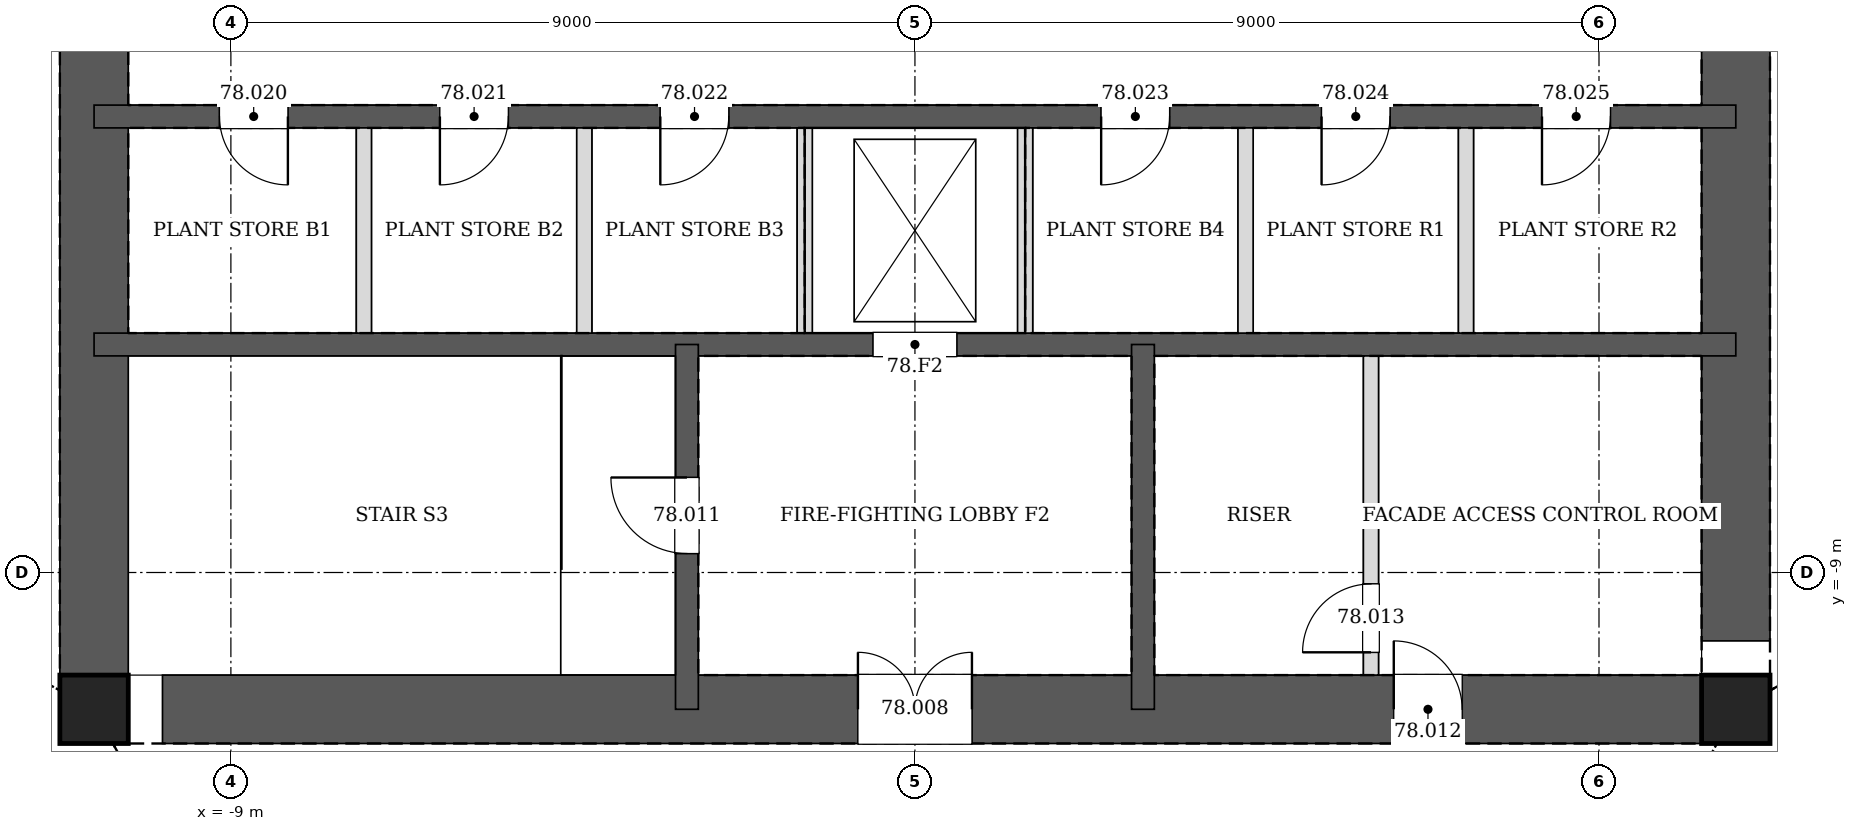
"""IFC4 building model, lengths in metres.
Left out: names, types, materials, properties, quantities, classifications, styles, units other than length and angle.
Written with IfcOpenShell. Run it as: python <this file> out.ifc"""

import sys

from ifc_helpers import new_model, si_unit, direction, frame, frame_2d, origin, origin_2d, place, context, subcontext, project, spatial, rectangle, hollow_rectangle, extrude, element, fill, save


model = new_model("IFC4")
c1 = context("Model", 3, precision=1e-05, world=origin(), true_north=direction((0.0, 1.0)))
c2 = subcontext(c1, "Body", "Model", "MODEL_VIEW")
j1 = project(units=[si_unit("LENGTHUNIT", "METRE"), si_unit("PLANEANGLEUNIT", "RADIAN")], contexts=[c1])
p1 = place(None, origin())
s1 = spatial("IfcSite", under=j1, at=p1, CompositionType="ELEMENT")
p2 = place(p1, origin())
s2 = spatial("IfcBuilding", under=s1, at=p2, CompositionType="ELEMENT")
p3 = place(p2, frame((0.0, 0.0, 317.6)))
s3 = spatial("IfcBuildingStorey", under=s2, at=p3, CompositionType="ELEMENT", Elevation=317.6)
for number, where, z_axis, x_axis in (
    (1, (-10.8, -10.8, 0.0), (0.0, 0.0, 1.0), (1.0, 0.0, 0.0)),
    (2, (10.8, -10.8, 0.0), (0.0, 0.0, 1.0), (1.0, 0.0, 0.0)),
):
    element("IfcColumn", number, at=place(p3, frame(where, z_axis=z_axis, x_axis=x_axis)), inside=s3, PredefinedType="COLUMN", context=c2, shape_type="SweptSolid", body=[
        extrude(hollow_rectangle(XDim=0.9, YDim=0.9, WallThickness=0.04, at=origin_2d()), origin(), (0.0, 0.0, 1.0), 6.0),
    ])
p4 = place(p3, frame((-10.8, -10.8, 0.0), z_axis=(0.0, 0.0, 1.0), x_axis=(1.0, 0.0, 0.0)))
e3 = element("IfcWall", 3, at=p4, inside=s3, PredefinedType="SOLIDWALL", context=c2, shape_type="SweptSolid", body=[
    extrude(rectangle(XDim=21.6, YDim=0.9, at=frame_2d((10.8, 0.0))), origin(), (0.0, 0.0, 1.0), 6.0),
])
p5 = place(p4, frame((10.05, 0.0, 0.0)))
e4 = element("IfcOpeningElement", 4, at=p5, cuts=e3, PredefinedType="OPENING", context=c2, shape_type="SweptSolid", body=[
    extrude(rectangle(XDim=1.5, YDim=2.1, at=frame_2d((0.75, 1.05))), frame((0.0, 0.46, 0.0), z_axis=(0.0, -1.0, 0.0), x_axis=(1.0, 0.0, 0.0)), (0.0, 0.0, 1.0), 0.92),
])
p6 = place(p4, frame((17.1, 0.0, 0.0)))
e5 = element("IfcOpeningElement", 5, at=p6, cuts=e3, PredefinedType="OPENING", context=c2, shape_type="SweptSolid", body=[
    extrude(rectangle(XDim=0.9, YDim=2.1, at=frame_2d((0.45, 1.05))), frame((0.0, 0.46, 0.0), z_axis=(0.0, -1.0, 0.0), x_axis=(1.0, 0.0, 0.0)), (0.0, 0.0, 1.0), 0.92),
])
p7 = place(p3, frame((10.8, -10.8, 0.0), z_axis=(0.0, 0.0, 1.0), x_axis=(0.0, 1.0, 0.0)))
e6 = element("IfcWall", 6, at=p7, inside=s3, PredefinedType="SOLIDWALL", context=c2, shape_type="SweptSolid", body=[
    extrude(rectangle(XDim=21.6, YDim=0.9, at=frame_2d((10.8, 0.0))), origin(), (0.0, 0.0, 1.0), 6.0),
])
p8 = place(p7, frame((11.7, 0.0, 0.0)))
e7 = element("IfcOpeningElement", 7, at=p8, cuts=e6, PredefinedType="OPENING", context=c2, shape_type="SweptSolid", body=[
    extrude(rectangle(XDim=1.2, YDim=2.1, at=frame_2d((0.6, 1.05))), frame((0.0, 0.46, 0.0), z_axis=(0.0, -1.0, 0.0), x_axis=(1.0, 0.0, 0.0)), (0.0, 0.0, 1.0), 0.92),
])
p9 = place(p7, frame((8.7, 0.0, 0.0)))
e8 = element("IfcOpeningElement", 8, at=p9, cuts=e6, PredefinedType="OPENING", context=c2, shape_type="SweptSolid", body=[
    extrude(rectangle(XDim=1.2, YDim=2.1, at=frame_2d((0.6, 1.05))), frame((0.0, 0.46, 0.0), z_axis=(0.0, -1.0, 0.0), x_axis=(1.0, 0.0, 0.0)), (0.0, 0.0, 1.0), 0.92),
])
p10 = place(p3, frame((-10.8, 10.8, 0.0), z_axis=(0.0, 0.0, 1.0), x_axis=(0.0, -1.0, 0.0)))
e9 = element("IfcWall", 9, at=p10, inside=s3, PredefinedType="SOLIDWALL", context=c2, shape_type="SweptSolid", body=[
    extrude(rectangle(XDim=21.6, YDim=0.9, at=frame_2d((10.8, 0.0))), origin(), (0.0, 0.0, 1.0), 6.0),
])
p11 = place(p10, frame((8.7, 0.0, 0.0)))
e10 = element("IfcOpeningElement", 10, at=p11, cuts=e9, PredefinedType="OPENING", context=c2, shape_type="SweptSolid", body=[
    extrude(rectangle(XDim=1.2, YDim=2.1, at=frame_2d((0.6, 1.05))), frame((0.0, 0.46, 0.0), z_axis=(0.0, -1.0, 0.0), x_axis=(1.0, 0.0, 0.0)), (0.0, 0.0, 1.0), 0.92),
])
p12 = place(p10, frame((11.7, 0.0, 0.0)))
e11 = element("IfcOpeningElement", 11, at=p12, cuts=e9, PredefinedType="OPENING", context=c2, shape_type="SweptSolid", body=[
    extrude(rectangle(XDim=1.2, YDim=2.1, at=frame_2d((0.6, 1.05))), frame((0.0, 0.46, 0.0), z_axis=(0.0, -1.0, 0.0), x_axis=(1.0, 0.0, 0.0)), (0.0, 0.0, 1.0), 0.92),
])
p13 = place(p3, frame((-10.8, -3.0, 0.0), z_axis=(0.0, 0.0, 1.0), x_axis=(1.0, 0.0, 0.0)))
e12 = element("IfcWall", 12, at=p13, inside=s3, PredefinedType="SOLIDWALL", context=c2, shape_type="SweptSolid", body=[
    extrude(rectangle(XDim=21.6, YDim=0.3, at=frame_2d((10.8, 0.0))), origin(), (0.0, 0.0, 1.0), 6.0),
])
p14 = place(p13, frame((1.65, 0.0, 0.0)))
e13 = element("IfcOpeningElement", 13, at=p14, cuts=e12, PredefinedType="OPENING", context=c2, shape_type="SweptSolid", body=[
    extrude(rectangle(XDim=0.9, YDim=2.1, at=frame_2d((0.45, 1.05))), frame((0.0, 0.16, 0.0), z_axis=(0.0, -1.0, 0.0), x_axis=(1.0, 0.0, 0.0)), (0.0, 0.0, 1.0), 0.32),
])
p15 = place(p13, frame((4.55, 0.0, 0.0)))
e14 = element("IfcOpeningElement", 14, at=p15, cuts=e12, PredefinedType="OPENING", context=c2, shape_type="SweptSolid", body=[
    extrude(rectangle(XDim=0.9, YDim=2.1, at=frame_2d((0.45, 1.05))), frame((0.0, 0.16, 0.0), z_axis=(0.0, -1.0, 0.0), x_axis=(1.0, 0.0, 0.0)), (0.0, 0.0, 1.0), 0.32),
])
p16 = place(p13, frame((7.45, 0.0, 0.0)))
e15 = element("IfcOpeningElement", 15, at=p16, cuts=e12, PredefinedType="OPENING", context=c2, shape_type="SweptSolid", body=[
    extrude(rectangle(XDim=0.9, YDim=2.1, at=frame_2d((0.45, 1.05))), frame((0.0, 0.16, 0.0), z_axis=(0.0, -1.0, 0.0), x_axis=(1.0, 0.0, 0.0)), (0.0, 0.0, 1.0), 0.32),
])
p17 = place(p13, frame((13.25, 0.0, 0.0)))
e16 = element("IfcOpeningElement", 16, at=p17, cuts=e12, PredefinedType="OPENING", context=c2, shape_type="SweptSolid", body=[
    extrude(rectangle(XDim=0.9, YDim=2.1, at=frame_2d((0.45, 1.05))), frame((0.0, 0.16, 0.0), z_axis=(0.0, -1.0, 0.0), x_axis=(1.0, 0.0, 0.0)), (0.0, 0.0, 1.0), 0.32),
])
p18 = place(p13, frame((16.15, 0.0, 0.0)))
e17 = element("IfcOpeningElement", 17, at=p18, cuts=e12, PredefinedType="OPENING", context=c2, shape_type="SweptSolid", body=[
    extrude(rectangle(XDim=0.9, YDim=2.1, at=frame_2d((0.45, 1.05))), frame((0.0, 0.16, 0.0), z_axis=(0.0, -1.0, 0.0), x_axis=(1.0, 0.0, 0.0)), (0.0, 0.0, 1.0), 0.32),
])
p19 = place(p13, frame((19.05, 0.0, 0.0)))
e18 = element("IfcOpeningElement", 18, at=p19, cuts=e12, PredefinedType="OPENING", context=c2, shape_type="SweptSolid", body=[
    extrude(rectangle(XDim=0.9, YDim=2.1, at=frame_2d((0.45, 1.05))), frame((0.0, 0.16, 0.0), z_axis=(0.0, -1.0, 0.0), x_axis=(1.0, 0.0, 0.0)), (0.0, 0.0, 1.0), 0.32),
])
p20 = place(p3, frame((-10.8, -6.0, 0.0), z_axis=(0.0, 0.0, 1.0), x_axis=(1.0, 0.0, 0.0)))
e19 = element("IfcWall", 19, at=p20, inside=s3, PredefinedType="SOLIDWALL", context=c2, shape_type="SweptSolid", body=[
    extrude(rectangle(XDim=21.6, YDim=0.3, at=frame_2d((10.8, 0.0))), origin(), (0.0, 0.0, 1.0), 6.0),
])
p21 = place(p20, frame((10.25, 0.0, 0.0)))
e20 = element("IfcOpeningElement", 20, at=p21, cuts=e19, PredefinedType="OPENING", context=c2, shape_type="SweptSolid", body=[
    extrude(rectangle(XDim=1.1, YDim=2.1, at=frame_2d((0.55, 1.05))), frame((0.0, 0.16, 0.0), z_axis=(0.0, -1.0, 0.0), x_axis=(1.0, 0.0, 0.0)), (0.0, 0.0, 1.0), 0.32),
])
p22 = place(p3, frame((-3.0, -6.0, 0.0), z_axis=(0.0, 0.0, 1.0), x_axis=(0.0, -1.0, 0.0)))
e21 = element("IfcWall", 21, at=p22, inside=s3, PredefinedType="SOLIDWALL", context=c2, shape_type="SweptSolid", body=[
    extrude(rectangle(XDim=4.8, YDim=0.3, at=frame_2d((2.4, 0.0))), origin(), (0.0, 0.0, 1.0), 6.0),
])
p23 = place(p22, frame((1.75, 0.0, 0.0)))
e22 = element("IfcOpeningElement", 22, at=p23, cuts=e21, PredefinedType="OPENING", context=c2, shape_type="SweptSolid", body=[
    extrude(rectangle(XDim=1.0, YDim=2.1, at=frame_2d((0.5, 1.05))), frame((0.0, 0.16, 0.0), z_axis=(0.0, -1.0, 0.0), x_axis=(1.0, 0.0, 0.0)), (0.0, 0.0, 1.0), 0.32),
])
p24 = place(p3, frame((3.0, -6.0, 0.0), z_axis=(0.0, 0.0, 1.0), x_axis=(0.0, -1.0, 0.0)))
e23 = element("IfcWall", 23, at=p24, inside=s3, PredefinedType="SOLIDWALL", context=c2, shape_type="SweptSolid", body=[
    extrude(rectangle(XDim=4.8, YDim=0.3, at=frame_2d((2.4, 0.0))), origin(), (0.0, 0.0, 1.0), 6.0),
])
for number, where, z_axis, x_axis in (
    (24, (-7.25, -5.85, 0.0), (0.0, 0.0, 1.0), (0.0, 1.0, 0.0)),
    (25, (-4.35, -5.85, 0.0), (0.0, 0.0, 1.0), (0.0, 1.0, 0.0)),
    (26, (-1.45, -5.85, 0.0), (0.0, 0.0, 1.0), (0.0, 1.0, 0.0)),
    (27, (1.45, -5.85, 0.0), (0.0, 0.0, 1.0), (0.0, 1.0, 0.0)),
    (28, (4.35, -5.85, 0.0), (0.0, 0.0, 1.0), (0.0, 1.0, 0.0)),
    (29, (7.25, -5.85, 0.0), (0.0, 0.0, 1.0), (0.0, 1.0, 0.0)),
):
    element("IfcWall", number, at=place(p3, frame(where, z_axis=z_axis, x_axis=x_axis)), inside=s3, PredefinedType="PARTITIONING", context=c2, shape_type="SweptSolid", body=[
        extrude(rectangle(XDim=2.7, YDim=0.2, at=frame_2d((1.35, 0.0))), origin(), (0.0, 0.0, 1.0), 5.75),
    ])
p25 = place(p3, frame((6.0, -10.35, 0.0), z_axis=(0.0, 0.0, 1.0), x_axis=(0.0, 1.0, 0.0)))
e30 = element("IfcWall", 30, at=p25, inside=s3, PredefinedType="PARTITIONING", context=c2, shape_type="SweptSolid", body=[
    extrude(rectangle(XDim=4.2, YDim=0.2, at=frame_2d((2.1, 0.0))), origin(), (0.0, 0.0, 1.0), 5.75),
])
p26 = place(p25, frame((0.3, 0.0, 0.0)))
e31 = element("IfcOpeningElement", 31, at=p26, cuts=e30, PredefinedType="OPENING", context=c2, shape_type="SweptSolid", body=[
    extrude(rectangle(XDim=0.9, YDim=2.1, at=frame_2d((0.45, 1.05))), frame((0.0, 0.11, 0.0), z_axis=(0.0, -1.0, 0.0), x_axis=(1.0, 0.0, 0.0)), (0.0, 0.0, 1.0), 0.22),
])
p27 = place(p5, origin())
e32 = element("IfcDoor", 32, at=p27, inside=s3, OperationType="DOUBLE_DOOR_SINGLE_SWING", PredefinedType="DOOR", context=c2, shape_type="SweptSolid", body=[
    extrude(rectangle(XDim=1.5, YDim=2.1, at=frame_2d((0.75, 1.05))), frame((0.0, 0.025, 0.0), z_axis=(0.0, -1.0, 0.0), x_axis=(1.0, 0.0, 0.0)), (0.0, 0.0, 1.0), 0.05),
])
fill(e4, e32)
p28 = place(p23, frame((1.0, 0.0, 0.0), z_axis=(0.0, 0.0, 1.0), x_axis=(-1.0, 0.0, 0.0)))
e33 = element("IfcDoor", 33, at=p28, inside=s3, OperationType="SINGLE_SWING_RIGHT", PredefinedType="DOOR", context=c2, shape_type="SweptSolid", body=[
    extrude(rectangle(XDim=1.0, YDim=2.1, at=frame_2d((0.5, 1.05))), frame((0.0, 0.025, 0.0), z_axis=(0.0, -1.0, 0.0), x_axis=(1.0, 0.0, 0.0)), (0.0, 0.0, 1.0), 0.05),
])
fill(e22, e33)
p29 = place(p6, origin())
e34 = element("IfcDoor", 34, at=p29, inside=s3, OperationType="SINGLE_SWING_LEFT", PredefinedType="DOOR", context=c2, shape_type="SweptSolid", body=[
    extrude(rectangle(XDim=0.9, YDim=2.1, at=frame_2d((0.45, 1.05))), frame((0.0, 0.025, 0.0), z_axis=(0.0, -1.0, 0.0), x_axis=(1.0, 0.0, 0.0)), (0.0, 0.0, 1.0), 0.05),
])
fill(e5, e34)
p30 = place(p26, origin())
e35 = element("IfcDoor", 35, at=p30, inside=s3, OperationType="SINGLE_SWING_LEFT", PredefinedType="DOOR", context=c2, shape_type="SweptSolid", body=[
    extrude(rectangle(XDim=0.9, YDim=2.1, at=frame_2d((0.45, 1.05))), frame((0.0, 0.025, 0.0), z_axis=(0.0, -1.0, 0.0), x_axis=(1.0, 0.0, 0.0)), (0.0, 0.0, 1.0), 0.05),
])
fill(e31, e35)
p31 = place(p14, frame((0.9, 0.0, 0.0), z_axis=(0.0, 0.0, 1.0), x_axis=(-1.0, 0.0, 0.0)))
e36 = element("IfcDoor", 36, at=p31, inside=s3, OperationType="SINGLE_SWING_LEFT", PredefinedType="DOOR", context=c2, shape_type="SweptSolid", body=[
    extrude(rectangle(XDim=0.9, YDim=2.1, at=frame_2d((0.45, 1.05))), frame((0.0, 0.025, 0.0), z_axis=(0.0, -1.0, 0.0), x_axis=(1.0, 0.0, 0.0)), (0.0, 0.0, 1.0), 0.05),
])
fill(e13, e36)
p32 = place(p15, frame((0.9, 0.0, 0.0), z_axis=(0.0, 0.0, 1.0), x_axis=(-1.0, 0.0, 0.0)))
e37 = element("IfcDoor", 37, at=p32, inside=s3, OperationType="SINGLE_SWING_RIGHT", PredefinedType="DOOR", context=c2, shape_type="SweptSolid", body=[
    extrude(rectangle(XDim=0.9, YDim=2.1, at=frame_2d((0.45, 1.05))), frame((0.0, 0.025, 0.0), z_axis=(0.0, -1.0, 0.0), x_axis=(1.0, 0.0, 0.0)), (0.0, 0.0, 1.0), 0.05),
])
fill(e14, e37)
p33 = place(p16, frame((0.9, 0.0, 0.0), z_axis=(0.0, 0.0, 1.0), x_axis=(-1.0, 0.0, 0.0)))
e38 = element("IfcDoor", 38, at=p33, inside=s3, OperationType="SINGLE_SWING_RIGHT", PredefinedType="DOOR", context=c2, shape_type="SweptSolid", body=[
    extrude(rectangle(XDim=0.9, YDim=2.1, at=frame_2d((0.45, 1.05))), frame((0.0, 0.025, 0.0), z_axis=(0.0, -1.0, 0.0), x_axis=(1.0, 0.0, 0.0)), (0.0, 0.0, 1.0), 0.05),
])
fill(e15, e38)
p34 = place(p17, frame((0.9, 0.0, 0.0), z_axis=(0.0, 0.0, 1.0), x_axis=(-1.0, 0.0, 0.0)))
e39 = element("IfcDoor", 39, at=p34, inside=s3, OperationType="SINGLE_SWING_RIGHT", PredefinedType="DOOR", context=c2, shape_type="SweptSolid", body=[
    extrude(rectangle(XDim=0.9, YDim=2.1, at=frame_2d((0.45, 1.05))), frame((0.0, 0.025, 0.0), z_axis=(0.0, -1.0, 0.0), x_axis=(1.0, 0.0, 0.0)), (0.0, 0.0, 1.0), 0.05),
])
fill(e16, e39)
p35 = place(p18, frame((0.9, 0.0, 0.0), z_axis=(0.0, 0.0, 1.0), x_axis=(-1.0, 0.0, 0.0)))
e40 = element("IfcDoor", 40, at=p35, inside=s3, OperationType="SINGLE_SWING_RIGHT", PredefinedType="DOOR", context=c2, shape_type="SweptSolid", body=[
    extrude(rectangle(XDim=0.9, YDim=2.1, at=frame_2d((0.45, 1.05))), frame((0.0, 0.025, 0.0), z_axis=(0.0, -1.0, 0.0), x_axis=(1.0, 0.0, 0.0)), (0.0, 0.0, 1.0), 0.05),
])
fill(e17, e40)
p36 = place(p19, frame((0.9, 0.0, 0.0), z_axis=(0.0, 0.0, 1.0), x_axis=(-1.0, 0.0, 0.0)))
e41 = element("IfcDoor", 41, at=p36, inside=s3, OperationType="SINGLE_SWING_RIGHT", PredefinedType="DOOR", context=c2, shape_type="SweptSolid", body=[
    extrude(rectangle(XDim=0.9, YDim=2.1, at=frame_2d((0.45, 1.05))), frame((0.0, 0.025, 0.0), z_axis=(0.0, -1.0, 0.0), x_axis=(1.0, 0.0, 0.0)), (0.0, 0.0, 1.0), 0.05),
])
fill(e18, e41)
p37 = place(p21, origin())
e42 = element("IfcDoor", 42, at=p37, inside=s3, OperationType="DOUBLE_DOOR_SLIDING", PredefinedType="DOOR", context=c2, shape_type="SweptSolid", body=[
    extrude(rectangle(XDim=1.1, YDim=2.1, at=frame_2d((0.55, 1.05))), frame((0.0, 0.025, 0.0), z_axis=(0.0, -1.0, 0.0), x_axis=(1.0, 0.0, 0.0)), (0.0, 0.0, 1.0), 0.05),
])
fill(e20, e42)
save(model, sys.argv[1])
